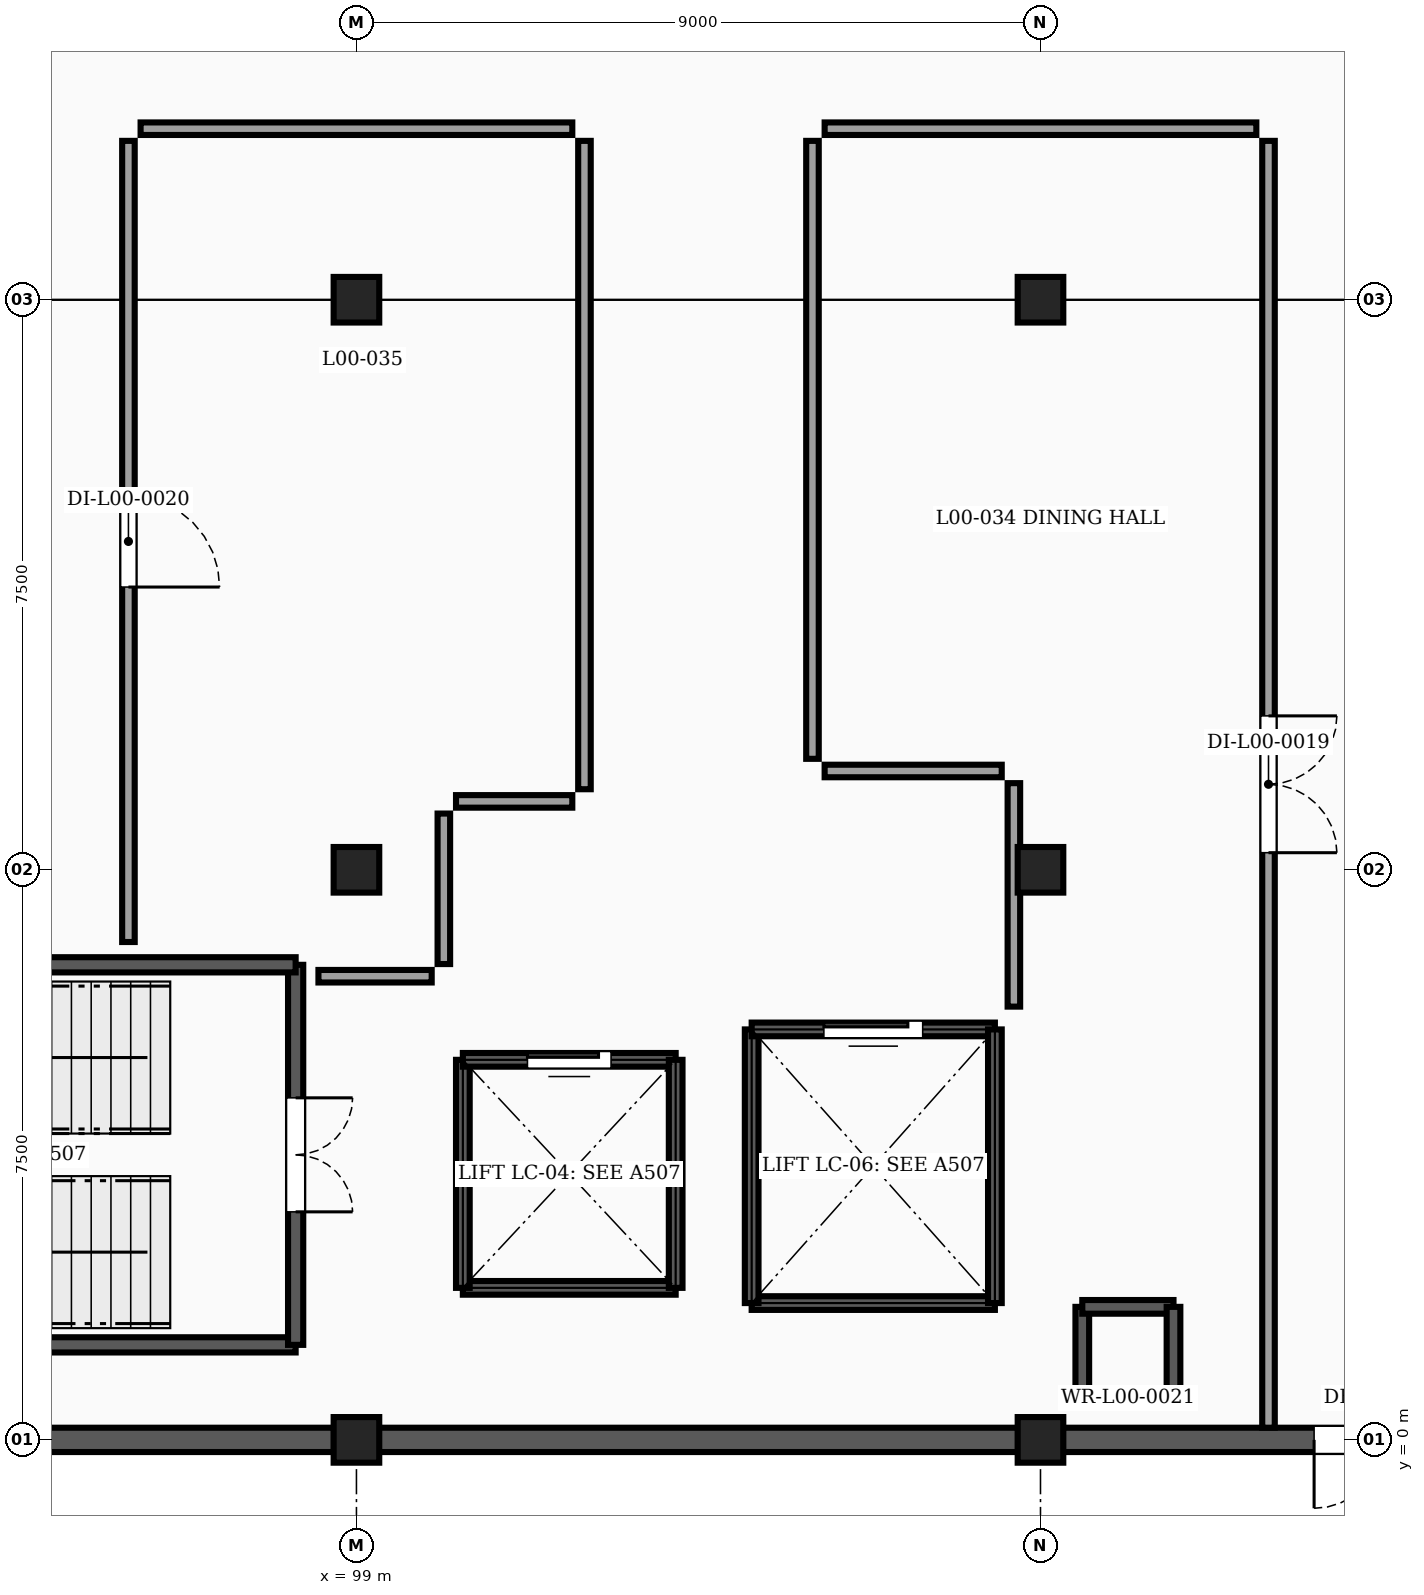
"""IFC4 building model, lengths in metres.
Left out: names, types, materials, properties, quantities, classifications, styles, units other than length and angle.
Written with IfcOpenShell. Run it as: python <this file> out.ifc"""

import sys

from ifc_helpers import new_model, si_unit, direction, frame, frame_2d, origin, origin_2d, place, context, subcontext, project, spatial, rectangle, extrude, element, fill, save


model = new_model("IFC4")
c1 = context("Model", 3, precision=1e-05, world=origin(), true_north=direction((0.0, 1.0)))
c2 = subcontext(c1, "Body", "Model", "MODEL_VIEW")
j1 = project(units=[si_unit("LENGTHUNIT", "METRE"), si_unit("PLANEANGLEUNIT", "RADIAN")], contexts=[c1])
p1 = place(None, origin())
s1 = spatial("IfcSite", under=j1, at=p1, CompositionType="ELEMENT")
p2 = place(p1, origin())
s2 = spatial("IfcBuilding", under=s1, at=p2, CompositionType="ELEMENT")
p3 = place(p2, origin())
s3 = spatial("IfcBuildingStorey", under=s2, at=p3, CompositionType="ELEMENT", Elevation=0.0)
for number, where, z_axis, x_axis in (
    (1, (99.0, 0.0, -0.25), (0.0, 0.0, 1.0), (1.0, 0.0, 0.0)),
    (2, (108.0, 0.0, -0.25), (0.0, 0.0, 1.0), (1.0, 0.0, 0.0)),
    (3, (99.0, 7.5, -0.25), (0.0, 0.0, 1.0), (1.0, 0.0, 0.0)),
    (4, (108.0, 7.5, -0.25), (0.0, 0.0, 1.0), (1.0, 0.0, 0.0)),
    (5, (99.0, 15.0, -0.25), (0.0, 0.0, 1.0), (1.0, 0.0, 0.0)),
    (6, (108.0, 15.0, -0.25), (0.0, 0.0, 1.0), (1.0, 0.0, 0.0)),
):
    element("IfcColumn", number, at=place(p3, frame(where, z_axis=z_axis, x_axis=x_axis)), inside=s3, PredefinedType="COLUMN", context=c2, shape_type="SweptSolid", body=[
        extrude(rectangle(XDim=0.6, YDim=0.6, at=origin_2d()), origin(), (0.0, 0.0, 1.0), 4.75),
    ])
p4 = place(p3, frame((116.704, 0.0, 0.0), z_axis=(0.0, 0.0, 1.0), x_axis=(-1.0, 0.0, 0.0)))
e7 = element("IfcWall", 7, at=p4, inside=s3, PredefinedType="SOLIDWALL", context=c2, shape_type="SweptSolid", body=[
    extrude(rectangle(XDim=8.408, YDim=0.32, at=frame_2d((4.204, 0.0))), origin(), (0.0, 0.0, 1.0), 3.442),
])
p5 = place(p4, frame((3.304, 0.0, 0.0)))
e8 = element("IfcOpeningElement", 8, at=p5, cuts=e7, PredefinedType="OPENING", context=c2, shape_type="SweptSolid", body=[
    extrude(rectangle(XDim=1.8, YDim=2.2, at=frame_2d((0.9, 1.1))), frame((0.0, 0.17, 0.0), z_axis=(0.0, -1.0, 0.0), x_axis=(1.0, 0.0, 0.0)), (0.0, 0.0, 1.0), 0.34),
])
p6 = place(p3, frame((107.704, 0.0, 0.0), z_axis=(0.0, 0.0, 1.0), x_axis=(-1.0, 0.0, 0.0)))
e9 = element("IfcWall", 9, at=p6, inside=s3, PredefinedType="SOLIDWALL", context=c2, shape_type="SweptSolid", body=[
    extrude(rectangle(XDim=8.408, YDim=0.32, at=frame_2d((4.204, 0.0))), origin(), (0.0, 0.0, 1.0), 3.442),
])
p7 = place(p3, frame((98.704, 0.0, 0.0), z_axis=(0.0, 0.0, 1.0), x_axis=(-1.0, 0.0, 0.0)))
e10 = element("IfcWall", 10, at=p7, inside=s3, PredefinedType="SOLIDWALL", context=c2, shape_type="SweptSolid", body=[
    extrude(rectangle(XDim=8.483, YDim=0.32, at=frame_2d((4.242, 0.0))), origin(), (0.0, 0.0, 1.0), 3.442),
])
for number, where, z_axis, x_axis in (
    (11, (109.75, 0.55, 0.0), (0.0, 0.0, 1.0), (-1.0, 0.0, 0.0)),
    (12, (108.55, 0.55, 0.0), (0.0, 0.0, 1.0), (0.0, 1.0, 0.0)),
    (13, (108.55, 1.75, 0.0), (0.0, 0.0, 1.0), (1.0, 0.0, 0.0)),
    (14, (109.75, 1.75, 0.0), (0.0, 0.0, 1.0), (0.0, -1.0, 0.0)),
):
    element("IfcWall", number, at=place(p3, frame(where, z_axis=z_axis, x_axis=x_axis)), inside=s3, PredefinedType="SHEAR", context=c2, shape_type="SweptSolid", body=[
        extrude(rectangle(XDim=1.2, YDim=0.18, at=frame_2d((0.6, 0.0))), origin(), (0.0, 0.0, 1.0), 4.1),
    ])
p8 = place(p3, frame((90.8, 1.25, 0.0), z_axis=(0.0, 0.0, 1.0), x_axis=(1.0, 0.0, 0.0)))
e15 = element("IfcWall", 15, at=p8, inside=s3, PredefinedType="SHEAR", context=c2, shape_type="SweptSolid", body=[
    extrude(rectangle(XDim=7.4, YDim=0.2, at=frame_2d((3.7, 0.0))), origin(), (0.0, 0.0, 1.0), 4.1),
])
p9 = place(p3, frame((98.2, 6.25, 0.0), z_axis=(0.0, 0.0, 1.0), x_axis=(0.0, -1.0, 0.0)))
e16 = element("IfcWall", 16, at=p9, inside=s3, PredefinedType="SHEAR", context=c2, shape_type="SweptSolid", body=[
    extrude(rectangle(XDim=5.0, YDim=0.2, at=frame_2d((2.5, 0.0))), origin(), (0.0, 0.0, 1.0), 4.1),
])
p10 = place(p9, frame((1.75, 0.0, 0.0)))
e17 = element("IfcOpeningElement", 17, at=p10, cuts=e16, PredefinedType="OPENING", context=c2, shape_type="SweptSolid", body=[
    extrude(rectangle(XDim=1.5, YDim=2.15, at=frame_2d((0.75, 1.075))), frame((0.0, 0.11, 0.0), z_axis=(0.0, -1.0, 0.0), x_axis=(1.0, 0.0, 0.0)), (0.0, 0.0, 1.0), 0.22),
])
p11 = place(p3, frame((98.2, 6.25, 0.0), z_axis=(0.0, 0.0, 1.0), x_axis=(-1.0, 0.0, 0.0)))
e18 = element("IfcWall", 18, at=p11, inside=s3, PredefinedType="SHEAR", context=c2, shape_type="SweptSolid", body=[
    extrude(rectangle(XDim=7.4, YDim=0.2, at=frame_2d((3.7, 0.0))), origin(), (0.0, 0.0, 1.0), 4.1),
])
p12 = place(p3, frame((103.2, 2.0, -0.2), z_axis=(0.0, 0.0, 1.0), x_axis=(-1.0, 0.0, 0.0)))
e19 = element("IfcWall", 19, at=p12, inside=s3, PredefinedType="SHEAR", context=c2, shape_type="SweptSolid", body=[
    extrude(rectangle(XDim=2.8, YDim=0.18, at=frame_2d((1.4, 0.0))), origin(), (0.0, 0.0, 1.0), 4.3),
])
p13 = place(p3, frame((100.4, 2.0, -0.2), z_axis=(0.0, 0.0, 1.0), x_axis=(0.0, 1.0, 0.0)))
e20 = element("IfcWall", 20, at=p13, inside=s3, PredefinedType="SHEAR", context=c2, shape_type="SweptSolid", body=[
    extrude(rectangle(XDim=3.0, YDim=0.18, at=frame_2d((1.5, 0.0))), origin(), (0.0, 0.0, 1.0), 4.3),
])
p14 = place(p3, frame((100.4, 5.0, -0.2), z_axis=(0.0, 0.0, 1.0), x_axis=(1.0, 0.0, 0.0)))
e21 = element("IfcWall", 21, at=p14, inside=s3, PredefinedType="SHEAR", context=c2, shape_type="SweptSolid", body=[
    extrude(rectangle(XDim=2.8, YDim=0.18, at=frame_2d((1.4, 0.0))), origin(), (0.0, 0.0, 1.0), 4.3),
])
p15 = place(p14, frame((0.85, 0.0, 0.2)))
e22 = element("IfcOpeningElement", 22, at=p15, cuts=e21, PredefinedType="OPENING", context=c2, shape_type="SweptSolid", body=[
    extrude(rectangle(XDim=1.1, YDim=2.15, at=frame_2d((0.55, 1.075))), frame((0.0, 0.1, 0.0), z_axis=(0.0, -1.0, 0.0), x_axis=(1.0, 0.0, 0.0)), (0.0, 0.0, 1.0), 0.2),
])
p16 = place(p3, frame((103.2, 5.0, -0.2), z_axis=(0.0, 0.0, 1.0), x_axis=(0.0, -1.0, 0.0)))
e23 = element("IfcWall", 23, at=p16, inside=s3, PredefinedType="SHEAR", context=c2, shape_type="SweptSolid", body=[
    extrude(rectangle(XDim=3.0, YDim=0.18, at=frame_2d((1.5, 0.0))), origin(), (0.0, 0.0, 1.0), 4.3),
])
p17 = place(p3, frame((107.4, 1.8, -0.2), z_axis=(0.0, 0.0, 1.0), x_axis=(-1.0, 0.0, 0.0)))
e24 = element("IfcWall", 24, at=p17, inside=s3, PredefinedType="SHEAR", context=c2, shape_type="SweptSolid", body=[
    extrude(rectangle(XDim=3.2, YDim=0.18, at=frame_2d((1.6, 0.0))), origin(), (0.0, 0.0, 1.0), 4.3),
])
p18 = place(p3, frame((104.2, 1.8, -0.2), z_axis=(0.0, 0.0, 1.0), x_axis=(0.0, 1.0, 0.0)))
e25 = element("IfcWall", 25, at=p18, inside=s3, PredefinedType="SHEAR", context=c2, shape_type="SweptSolid", body=[
    extrude(rectangle(XDim=3.6, YDim=0.18, at=frame_2d((1.8, 0.0))), origin(), (0.0, 0.0, 1.0), 4.3),
])
p19 = place(p3, frame((104.2, 5.4, -0.2), z_axis=(0.0, 0.0, 1.0), x_axis=(1.0, 0.0, 0.0)))
e26 = element("IfcWall", 26, at=p19, inside=s3, PredefinedType="SHEAR", context=c2, shape_type="SweptSolid", body=[
    extrude(rectangle(XDim=3.2, YDim=0.18, at=frame_2d((1.6, 0.0))), origin(), (0.0, 0.0, 1.0), 4.3),
])
p20 = place(p19, frame((0.95, 0.0, 0.2)))
e27 = element("IfcOpeningElement", 27, at=p20, cuts=e26, PredefinedType="OPENING", context=c2, shape_type="SweptSolid", body=[
    extrude(rectangle(XDim=1.3, YDim=2.2, at=frame_2d((0.65, 1.1))), frame((0.0, 0.1, 0.0), z_axis=(0.0, -1.0, 0.0), x_axis=(1.0, 0.0, 0.0)), (0.0, 0.0, 1.0), 0.2),
])
p21 = place(p3, frame((107.4, 5.4, -0.2), z_axis=(0.0, 0.0, 1.0), x_axis=(0.0, -1.0, 0.0)))
e28 = element("IfcWall", 28, at=p21, inside=s3, PredefinedType="SHEAR", context=c2, shape_type="SweptSolid", body=[
    extrude(rectangle(XDim=3.6, YDim=0.18, at=frame_2d((1.8, 0.0))), origin(), (0.0, 0.0, 1.0), 4.3),
])
p22 = place(p3, frame((111.0, 17.09, 0.0), z_axis=(0.0, 0.0, 1.0), x_axis=(0.0, -1.0, 0.0)))
e29 = element("IfcWall", 29, at=p22, inside=s3, PredefinedType="PARTITIONING", context=c2, shape_type="SweptSolid", body=[
    extrude(rectangle(XDim=16.93, YDim=0.165, at=frame_2d((8.465, 0.0))), origin(), (0.0, 0.0, 1.0), 3.788),
])
p23 = place(p22, frame((7.565, 0.0, 0.0)))
e30 = element("IfcOpeningElement", 30, at=p23, cuts=e29, PredefinedType="OPENING", context=c2, shape_type="SweptSolid", body=[
    extrude(rectangle(XDim=1.8, YDim=2.25, at=frame_2d((0.9, 1.125))), frame((0.0, 0.093, 0.0), z_axis=(0.0, -1.0, 0.0), x_axis=(1.0, 0.0, 0.0)), (0.0, 0.0, 1.0), 0.185),
])
p24 = place(p3, frame((105.16, 17.25, 0.0), z_axis=(0.0, 0.0, 1.0), x_axis=(1.0, 0.0, 0.0)))
e31 = element("IfcWall", 31, at=p24, inside=s3, PredefinedType="PARTITIONING", context=c2, shape_type="SweptSolid", body=[
    extrude(rectangle(XDim=5.68, YDim=0.165, at=frame_2d((2.84, 0.0))), origin(), (0.0, 0.0, 1.0), 4.1),
])
p25 = place(p3, frame((105.0, 8.96, 0.0), z_axis=(0.0, 0.0, 1.0), x_axis=(0.0, 1.0, 0.0)))
e32 = element("IfcWall", 32, at=p25, inside=s3, PredefinedType="PARTITIONING", context=c2, shape_type="SweptSolid", body=[
    extrude(rectangle(XDim=8.13, YDim=0.165, at=frame_2d((4.065, 0.0))), origin(), (0.0, 0.0, 1.0), 3.788),
])
p26 = place(p3, frame((107.49, 8.8, 0.0), z_axis=(0.0, 0.0, 1.0), x_axis=(-1.0, 0.0, 0.0)))
e33 = element("IfcWall", 33, at=p26, inside=s3, PredefinedType="PARTITIONING", context=c2, shape_type="SweptSolid", body=[
    extrude(rectangle(XDim=2.33, YDim=0.165, at=frame_2d((1.165, 0.0))), origin(), (0.0, 0.0, 1.0), 4.1),
])
p27 = place(p3, frame((107.65, 5.7, 0.0), z_axis=(0.0, 0.0, 1.0), x_axis=(0.0, 1.0, 0.0)))
e34 = element("IfcWall", 34, at=p27, inside=s3, PredefinedType="PARTITIONING", context=c2, shape_type="SweptSolid", body=[
    extrude(rectangle(XDim=2.94, YDim=0.165, at=frame_2d((1.47, 0.0))), origin(), (0.0, 0.0, 1.0), 3.142),
])
p28 = place(p3, frame((100.31, 8.4, 0.0), z_axis=(0.0, 0.0, 1.0), x_axis=(1.0, 0.0, 0.0)))
e35 = element("IfcWall", 35, at=p28, inside=s3, PredefinedType="PARTITIONING", context=c2, shape_type="SweptSolid", body=[
    extrude(rectangle(XDim=1.53, YDim=0.165, at=frame_2d((0.765, 0.0))), origin(), (0.0, 0.0, 1.0), 4.1),
])
p29 = place(p3, frame((102.0, 8.56, 0.0), z_axis=(0.0, 0.0, 1.0), x_axis=(0.0, 1.0, 0.0)))
e36 = element("IfcWall", 36, at=p29, inside=s3, PredefinedType="PARTITIONING", context=c2, shape_type="SweptSolid", body=[
    extrude(rectangle(XDim=8.53, YDim=0.165, at=frame_2d((4.265, 0.0))), origin(), (0.0, 0.0, 1.0), 3.788),
])
p30 = place(p3, frame((101.84, 17.25, 0.0), z_axis=(0.0, 0.0, 1.0), x_axis=(-1.0, 0.0, 0.0)))
e37 = element("IfcWall", 37, at=p30, inside=s3, PredefinedType="PARTITIONING", context=c2, shape_type="SweptSolid", body=[
    extrude(rectangle(XDim=5.68, YDim=0.165, at=frame_2d((2.84, 0.0))), origin(), (0.0, 0.0, 1.0), 4.1),
])
p31 = place(p3, frame((96.0, 17.09, 0.0), z_axis=(0.0, 0.0, 1.0), x_axis=(0.0, -1.0, 0.0)))
e38 = element("IfcWall", 38, at=p31, inside=s3, PredefinedType="PARTITIONING", context=c2, shape_type="SweptSolid", body=[
    extrude(rectangle(XDim=10.54, YDim=0.165, at=frame_2d((5.27, 0.0))), origin(), (0.0, 0.0, 1.0), 3.788),
])
p32 = place(p31, frame((4.67, 0.0, 0.0)))
e39 = element("IfcOpeningElement", 39, at=p32, cuts=e38, PredefinedType="OPENING", context=c2, shape_type="SweptSolid", body=[
    extrude(rectangle(XDim=1.2, YDim=2.15, at=frame_2d((0.6, 1.075))), frame((0.0, 0.093, 0.0), z_axis=(0.0, -1.0, 0.0), x_axis=(1.0, 0.0, 0.0)), (0.0, 0.0, 1.0), 0.185),
])
p33 = place(p3, frame((98.5, 6.1, 0.0), z_axis=(0.0, 0.0, 1.0), x_axis=(1.0, 0.0, 0.0)))
e40 = element("IfcWall", 40, at=p33, inside=s3, PredefinedType="PARTITIONING", context=c2, shape_type="SweptSolid", body=[
    extrude(rectangle(XDim=1.49, YDim=0.165, at=frame_2d((0.745, 0.0))), origin(), (0.0, 0.0, 1.0), 4.1),
])
p34 = place(p3, frame((100.15, 6.26, 0.0), z_axis=(0.0, 0.0, 1.0), x_axis=(0.0, 1.0, 0.0)))
e41 = element("IfcWall", 41, at=p34, inside=s3, PredefinedType="PARTITIONING", context=c2, shape_type="SweptSolid", body=[
    extrude(rectangle(XDim=1.98, YDim=0.165, at=frame_2d((0.99, 0.0))), origin(), (0.0, 0.0, 1.0), 4.1),
])
p35 = place(p5, origin())
e42 = element("IfcDoor", 42, at=p35, inside=s3, OperationType="DOUBLE_DOOR_SINGLE_SWING", PredefinedType="DOOR", context=c2, shape_type="SweptSolid", body=[
    extrude(rectangle(XDim=1.8, YDim=2.2, at=frame_2d((0.9, 1.1))), frame((0.0, 0.025, 0.0), z_axis=(0.0, -1.0, 0.0), x_axis=(1.0, 0.0, 0.0)), (0.0, 0.0, 1.0), 0.05),
])
fill(e8, e42)
p36 = place(p10, origin())
e43 = element("IfcDoor", 43, at=p36, inside=s3, OperationType="DOUBLE_DOOR_SINGLE_SWING", PredefinedType="DOOR", context=c2, shape_type="SweptSolid", body=[
    extrude(rectangle(XDim=1.5, YDim=2.15, at=frame_2d((0.75, 1.075))), frame((0.0, 0.025, 0.0), z_axis=(0.0, -1.0, 0.0), x_axis=(1.0, 0.0, 0.0)), (0.0, 0.0, 1.0), 0.05),
])
fill(e17, e43)
p37 = place(p15, origin())
e44 = element("IfcDoor", 44, at=p37, inside=s3, OperationType="SLIDING_TO_LEFT", PredefinedType="DOOR", context=c2, shape_type="SweptSolid", body=[
    extrude(rectangle(XDim=1.1, YDim=2.15, at=frame_2d((0.55, 1.075))), frame((0.0, 0.025, 0.0), z_axis=(0.0, -1.0, 0.0), x_axis=(1.0, 0.0, 0.0)), (0.0, 0.0, 1.0), 0.05),
])
fill(e22, e44)
p38 = place(p20, origin())
e45 = element("IfcDoor", 45, at=p38, inside=s3, OperationType="SLIDING_TO_LEFT", PredefinedType="DOOR", context=c2, shape_type="SweptSolid", body=[
    extrude(rectangle(XDim=1.3, YDim=2.2, at=frame_2d((0.65, 1.1))), frame((0.0, 0.025, 0.0), z_axis=(0.0, -1.0, 0.0), x_axis=(1.0, 0.0, 0.0)), (0.0, 0.0, 1.0), 0.05),
])
fill(e27, e45)
p39 = place(p23, origin())
e46 = element("IfcDoor", 46, at=p39, inside=s3, OperationType="DOUBLE_DOOR_SINGLE_SWING", PredefinedType="DOOR", context=c2, shape_type="SweptSolid", body=[
    extrude(rectangle(XDim=1.8, YDim=2.25, at=frame_2d((0.9, 1.125))), frame((0.0, 0.025, 0.0), z_axis=(0.0, -1.0, 0.0), x_axis=(1.0, 0.0, 0.0)), (0.0, 0.0, 1.0), 0.05),
])
fill(e30, e46)
p40 = place(p32, origin())
e47 = element("IfcDoor", 47, at=p40, inside=s3, OperationType="SINGLE_SWING_RIGHT", PredefinedType="DOOR", context=c2, shape_type="SweptSolid", body=[
    extrude(rectangle(XDim=1.2, YDim=2.15, at=frame_2d((0.6, 1.075))), frame((0.0, 0.025, 0.0), z_axis=(0.0, -1.0, 0.0), x_axis=(1.0, 0.0, 0.0)), (0.0, 0.0, 1.0), 0.05),
])
fill(e39, e47)
save(model, sys.argv[1])
